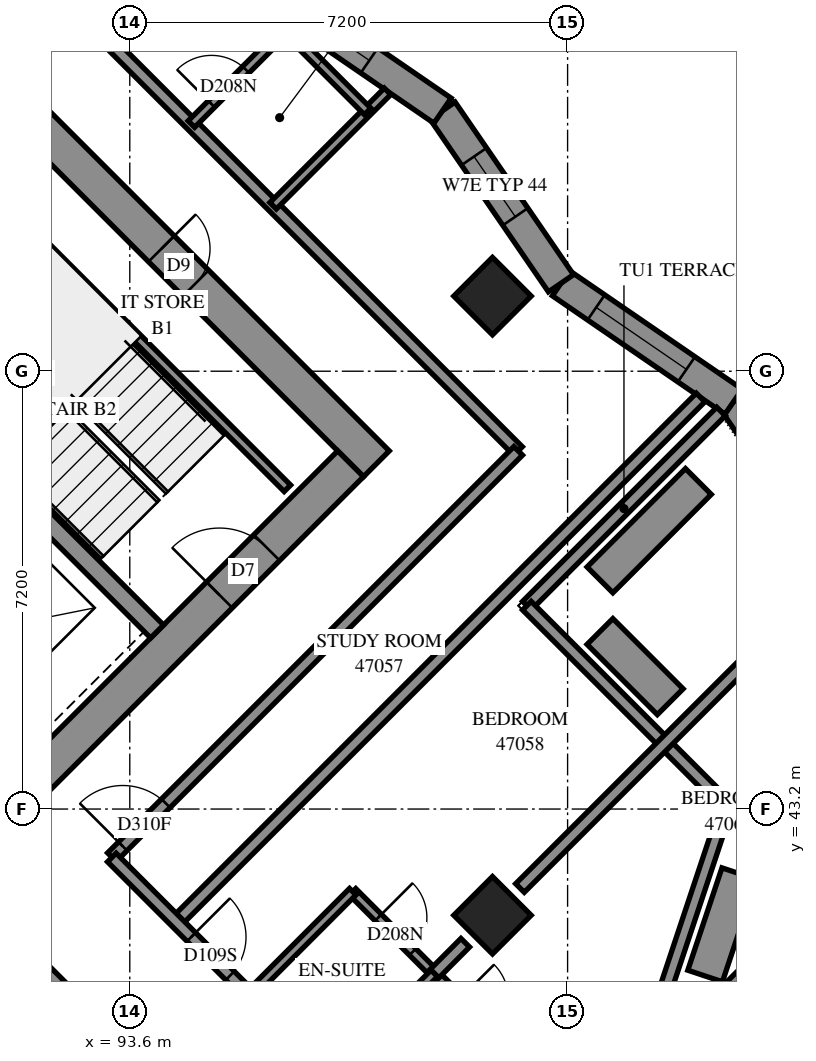
"""IFC4 building model, lengths in metres.
Left out: names, types, materials, properties, quantities, classifications, styles, units other than length and angle.
Written with IfcOpenShell. Run it as: python <this file> out.ifc"""

import sys

from ifc_helpers import new_model, si_unit, direction, frame, frame_2d, origin, origin_2d, place, context, subcontext, project, spatial, polyline, rectangle, outline, extrude, element, fill, save


model = new_model("IFC4")
c1 = context("Model", 3, precision=1e-05, world=origin(), true_north=direction((0.0, 1.0)))
c2 = subcontext(c1, "Body", "Model", "MODEL_VIEW")
j1 = project(units=[si_unit("LENGTHUNIT", "METRE"), si_unit("PLANEANGLEUNIT", "RADIAN")], contexts=[c1])
p1 = place(None, origin())
s1 = spatial("IfcSite", under=j1, at=p1, CompositionType="ELEMENT")
p2 = place(p1, origin())
s2 = spatial("IfcBuilding", under=s1, at=p2, CompositionType="ELEMENT")
p3 = place(p2, frame((0.0, 0.0, 172.8)))
s3 = spatial("IfcBuildingStorey", under=s2, at=p3, CompositionType="ELEMENT", Elevation=172.8)
for number, where, z_axis, x_axis in (
    (1, (99.565, 51.635, 0.0), (0.0, 0.0, 1.0), (0.707, -0.707, 0.0)),
    (2, (99.565, 41.453, 0.0), (0.0, 0.0, 1.0), (0.707, -0.707, 0.0)),
):
    element("IfcColumn", number, at=place(p3, frame(where, z_axis=z_axis, x_axis=x_axis)), inside=s3, PredefinedType="COLUMN", context=c2, shape_type="SweptSolid", body=[
        extrude(rectangle(XDim=0.9, YDim=0.9, at=origin_2d()), origin(), (0.0, 0.0, 1.0), 3.1),
    ])
p4 = place(p3, frame((86.625, 59.908, -0.3), z_axis=(0.0, 0.0, 1.0), x_axis=(0.7071067812, -0.7071067812, 0.0)))
e3 = element("IfcWall", 3, at=p4, inside=s3, PredefinedType="SHEAR", context=c2, shape_type="SweptSolid", body=[
    extrude(rectangle(XDim=15.6, YDim=0.6, at=frame_2d((7.8, 0.0))), origin(), (0.0, 0.0, 1.0), 2.7),
])
p5 = place(p4, frame((10.6, 0.0, 0.3)))
e4 = element("IfcOpeningElement", 4, at=p5, cuts=e3, PredefinedType="OPENING", context=c2, shape_type="SweptSolid", body=[
    extrude(rectangle(XDim=0.8, YDim=2.1, at=frame_2d((0.4, 1.05))), frame((0.0, 0.31, 0.0), z_axis=(0.0, -1.0, 0.0), x_axis=(1.0, 0.0, 0.0)), (0.0, 0.0, 1.0), 0.62),
])
p6 = place(p3, frame((87.049, 38.695, -0.3), z_axis=(0.0, 0.0, 1.0), x_axis=(0.7071067812, 0.7071067812, 0.0)))
e5 = element("IfcWall", 5, at=p6, inside=s3, PredefinedType="SHEAR", context=c2, shape_type="SweptSolid", body=[
    extrude(rectangle(XDim=14.4, YDim=0.6, at=frame_2d((7.2, 0.0))), origin(), (0.0, 0.0, 1.0), 2.7),
])
p7 = place(p6, frame((4.55, 0.0, 0.3)))
e6 = element("IfcOpeningElement", 6, at=p7, cuts=e5, PredefinedType="OPENING", context=c2, shape_type="SweptSolid", body=[
    extrude(rectangle(XDim=1.1, YDim=2.1, at=frame_2d((0.55, 1.05))), frame((0.0, 0.31, 0.0), z_axis=(0.0, -1.0, 0.0), x_axis=(1.0, 0.0, 0.0)), (0.0, 0.0, 1.0), 0.62),
])
p8 = place(p6, frame((11.35, 0.0, 0.3)))
e7 = element("IfcOpeningElement", 7, at=p8, cuts=e5, PredefinedType="OPENING", context=c2, shape_type="SweptSolid", body=[
    extrude(rectangle(XDim=1.1, YDim=2.1, at=frame_2d((0.55, 1.05))), frame((0.0, 0.31, 0.0), z_axis=(0.0, -1.0, 0.0), x_axis=(1.0, 0.0, 0.0)), (0.0, 0.0, 1.0), 0.62),
])
p9 = place(p3, frame((88.958, 51.211, 0.0), z_axis=(0.0, 0.0, 1.0), x_axis=(0.7070998367, -0.7071137256, 0.0)))
e8 = element("IfcWall", 8, at=p9, inside=s3, PredefinedType="SOLIDWALL", context=c2, shape_type="SweptSolid", body=[
    extrude(rectangle(XDim=7.2, YDim=0.3, at=frame_2d((3.6, 0.0))), origin(), (0.0, 0.0, 1.0), 3.1),
])
p10 = place(p3, frame((105.489, 47.042, 0.0), z_axis=(0.0, 0.0, 1.0), x_axis=(-0.5657493712, 0.8245772547, 0.0)))
e9 = element("IfcWall", 9, at=p10, inside=s3, PredefinedType="SOLIDWALL", context=c2, shape_type="SweptSolid", body=[
    extrude(outline(polyline([(0.068, -0.25), (3.511, -0.25), (3.417, 0.25), (-0.068, 0.25), (0.068, -0.25)])), origin(), (0.0, 0.0, 1.0), 3.1),
])
p11 = place(p10, frame((0.809, 0.0, 0.7)))
e10 = element("IfcOpeningElement", 10, at=p11, cuts=e9, PredefinedType="OPENING", context=c2, shape_type="SweptSolid", body=[
    extrude(rectangle(XDim=1.8, YDim=1.8, at=frame_2d((0.9, 0.9))), frame((0.0, 0.26, 0.0), z_axis=(0.0, -1.0, 0.0), x_axis=(1.0, 0.0, 0.0)), (0.0, 0.0, 1.0), 0.52),
])
p12 = place(p3, frame((103.53, 49.899, 0.0), z_axis=(0.0, 0.0, 1.0), x_axis=(-0.8245704852, 0.5657592376, 0.0)))
e11 = element("IfcWall", 11, at=p12, inside=s3, PredefinedType="SOLIDWALL", context=c2, shape_type="SweptSolid", body=[
    extrude(outline(polyline([(-0.046, -0.25), (3.396, -0.25), (3.489, 0.25), (0.046, 0.25), (-0.046, -0.25)])), origin(), (0.0, 0.0, 1.0), 3.1),
])
p13 = place(p12, frame((0.941, 0.0, 0.7)))
e12 = element("IfcOpeningElement", 12, at=p13, cuts=e11, PredefinedType="OPENING", context=c2, shape_type="SweptSolid", body=[
    extrude(rectangle(XDim=1.8, YDim=2.1, at=frame_2d((0.9, 1.05))), frame((0.0, 0.26, 0.0), z_axis=(0.0, -1.0, 0.0), x_axis=(1.0, 0.0, 0.0)), (0.0, 0.0, 1.0), 0.52),
])
p14 = place(p3, frame((100.691, 51.846, 0.0), z_axis=(0.0, 0.0, 1.0), x_axis=(-0.5657654369, 0.8245662316, 0.0)))
e13 = element("IfcWall", 13, at=p14, inside=s3, PredefinedType="SOLIDWALL", context=c2, shape_type="SweptSolid", body=[
    extrude(outline(polyline([(0.046, -0.25), (3.489, -0.25), (3.396, 0.25), (-0.046, 0.25), (0.046, -0.25)])), origin(), (0.0, 0.0, 1.0), 3.1),
])
p15 = place(p14, frame((1.327, 0.0, 0.45)))
e14 = element("IfcOpeningElement", 14, at=p15, cuts=e13, PredefinedType="OPENING", context=c2, shape_type="SweptSolid", body=[
    extrude(rectangle(XDim=1.2, YDim=2.5, at=frame_2d((0.6, 1.25))), frame((0.0, 0.26, 0.0), z_axis=(0.0, -1.0, 0.0), x_axis=(1.0, 0.0, 0.0)), (0.0, 0.0, 1.0), 0.52),
])
p16 = place(p3, frame((98.744, 54.685, 0.0), z_axis=(0.0, 0.0, 1.0), x_axis=(-0.8245797835, 0.5657456855, 0.0)))
e15 = element("IfcWall", 15, at=p16, inside=s3, PredefinedType="SOLIDWALL", context=c2, shape_type="SweptSolid", body=[
    extrude(outline(polyline([(-0.046, -0.25), (3.396, -0.25), (3.489, 0.25), (0.046, 0.25), (-0.046, -0.25)])), origin(), (0.0, 0.0, 1.0), 3.1),
])
p17 = place(p16, frame((1.46, 0.0, 0.45)))
e16 = element("IfcOpeningElement", 16, at=p17, cuts=e15, PredefinedType="OPENING", context=c2, shape_type="SweptSolid", body=[
    extrude(rectangle(XDim=1.2, YDim=2.5, at=frame_2d((0.6, 1.25))), frame((0.0, 0.26, 0.0), z_axis=(0.0, -1.0, 0.0), x_axis=(1.0, 0.0, 0.0)), (0.0, 0.0, 1.0), 0.52),
])
p18 = place(p3, frame((103.323, 49.737, 0.0), z_axis=(0.0, 0.0, 1.0), x_axis=(-0.707117854, -0.7070957082, 0.0)))
e17 = element("IfcWall", 17, at=p18, inside=s3, PredefinedType="PARAPET", context=c2, shape_type="SweptSolid", body=[
    extrude(outline(polyline([(0.0, -0.1), (4.615, -0.1), (4.415, 0.1), (0.0, 0.1), (0.0, -0.1)])), origin(), (0.0, 0.0, 1.0), 0.25),
])
p19 = place(p3, frame((100.13, 46.544, 0.0), z_axis=(0.0, 0.0, 1.0), x_axis=(0.7070852627, -0.707128299, 0.0)))
e18 = element("IfcWall", 18, at=p19, inside=s3, PredefinedType="PARAPET", context=c2, shape_type="SweptSolid", body=[
    extrude(outline(polyline([(-0.1, -0.1), (4.585, -0.1), (4.709, 0.1), (0.1, 0.1), (-0.1, -0.1)])), origin(), (0.0, 0.0, 1.0), 0.25),
])
p20 = place(p3, frame((103.416, 43.258, 0.0), z_axis=(0.0, 0.0, 1.0), x_axis=(-0.3160011426, -0.9487588091, 0.0)))
e19 = element("IfcWall", 19, at=p20, inside=s3, PredefinedType="PARAPET", context=c2, shape_type="SweptSolid", body=[
    extrude(outline(polyline([(0.062, -0.1), (0.397, -0.1), (0.397, 0.1), (-0.062, 0.1), (0.062, -0.1)])), origin(), (0.0, 0.0, 1.0), 0.25),
])
p21 = place(p3, frame((103.291, 42.881, 0.0), z_axis=(0.0, 0.0, 1.0), x_axis=(-0.3162443117, -0.9486777827, 0.0)))
e20 = element("IfcWall", 20, at=p21, inside=s3, PredefinedType="PARAPET", context=c2, shape_type="SweptSolid", body=[
    extrude(outline(polyline([(0.0, -0.1), (3.626, -0.1), (3.626, 0.1), (0.0, 0.1), (0.0, -0.1)])), origin(), (0.0, 0.0, 1.0), 0.25),
])
p22 = place(p3, frame((101.332, 46.12, 0.0), z_axis=(0.0, 0.0, 1.0), x_axis=(0.7070761738, -0.7071373872, 0.0)))
e21 = element("IfcWall", 21, at=p22, inside=s3, PredefinedType="SOLIDWALL", context=c2, shape_type="SweptSolid", body=[
    extrude(rectangle(XDim=1.634, YDim=0.6, at=frame_2d((0.817, 0.0))), origin(), (0.0, 0.0, 1.0), 0.65),
])
p23 = place(p3, frame((103.623, 42.138, 0.0), z_axis=(0.0, 0.0, 1.0), x_axis=(-0.3162446684, -0.9486776638, 0.0)))
e22 = element("IfcWall", 22, at=p23, inside=s3, PredefinedType="SOLIDWALL", context=c2, shape_type="SweptSolid", body=[
    extrude(rectangle(XDim=1.775, YDim=0.6, at=frame_2d((0.887, 0.0))), origin(), (0.0, 0.0, 1.0), 0.65),
])
p24 = place(p3, frame((91.313, 53.354, 0.0), z_axis=(0.0, 0.0, 1.0), x_axis=(0.7071140275, -0.7070995348, 0.0)))
e23 = element("IfcWall", 23, at=p24, inside=s3, PredefinedType="PARTITIONING", context=c2, shape_type="SweptSolid", body=[
    extrude(rectangle(XDim=6.9, YDim=0.15, at=frame_2d((3.45, 0.0))), origin(), (0.0, 0.0, 1.0), 3.1),
])
p25 = place(p3, frame((94.366, 41.348, 0.0), z_axis=(0.0, 0.0, 1.0), x_axis=(0.7071108825, 0.7071026798, 0.0)))
e24 = element("IfcWall", 24, at=p25, inside=s3, PredefinedType="PARTITIONING", context=c2, shape_type="SweptSolid", body=[
    extrude(rectangle(XDim=12.191, YDim=0.2, at=frame_2d((6.096, 0.0))), origin(), (0.0, 0.0, 1.0), 3.1),
])
p26 = place(p3, frame((91.967, 40.785, 0.0), z_axis=(0.0, 0.0, 1.0), x_axis=(0.7071067812, -0.7071067812, 0.0)))
e25 = element("IfcWall", 25, at=p26, inside=s3, PredefinedType="PARTITIONING", context=c2, shape_type="SweptSolid", body=[
    extrude(rectangle(XDim=12.1, YDim=0.2, at=frame_2d((6.05, 0.0))), origin(), (0.0, 0.0, 1.0), 3.1),
])
p27 = place(p26, frame((3.448, 0.0, 0.0)))
e26 = element("IfcOpeningElement", 26, at=p27, cuts=e25, PredefinedType="OPENING", context=c2, shape_type="SweptSolid", body=[
    extrude(rectangle(XDim=0.9, YDim=2.1, at=frame_2d((0.45, 1.05))), frame((0.0, 0.11, 0.0), z_axis=(0.0, -1.0, 0.0), x_axis=(1.0, 0.0, 0.0)), (0.0, 0.0, 1.0), 0.22),
])
p28 = place(p26, frame((8.457, 0.0, 0.0)))
e27 = element("IfcOpeningElement", 27, at=p28, cuts=e25, PredefinedType="OPENING", context=c2, shape_type="SweptSolid", body=[
    extrude(rectangle(XDim=1.0, YDim=2.1, at=frame_2d((0.5, 1.05))), frame((0.0, 0.11, 0.0), z_axis=(0.0, -1.0, 0.0), x_axis=(1.0, 0.0, 0.0)), (0.0, 0.0, 1.0), 0.22),
])
p29 = place(p3, frame((91.755, 57.317, 0.0), z_axis=(0.0, 0.0, 1.0), x_axis=(0.7071067812, -0.7071067812, 0.0)))
e28 = element("IfcWall", 28, at=p29, inside=s3, PredefinedType="PARTITIONING", context=c2, shape_type="SweptSolid", body=[
    extrude(rectangle(XDim=11.639, YDim=0.2, at=frame_2d((5.819, 0.0))), origin(), (0.0, 0.0, 1.0), 3.1),
])
p30 = place(p3, frame((93.306, 42.408, 0.0), z_axis=(0.0, 0.0, 1.0), x_axis=(0.7071067812, 0.7071067812, 0.0)))
e29 = element("IfcWall", 29, at=p30, inside=s3, PredefinedType="PARTITIONING", context=c2, shape_type="SweptSolid", body=[
    extrude(rectangle(XDim=9.45, YDim=0.2, at=frame_2d((4.725, 0.0))), origin(), (0.0, 0.0, 1.0), 3.1),
])
p31 = place(p30, frame((0.253, 0.0, 0.0)))
e30 = element("IfcOpeningElement", 30, at=p31, cuts=e29, PredefinedType="OPENING", context=c2, shape_type="SweptSolid", body=[
    extrude(rectangle(XDim=1.0, YDim=2.1, at=frame_2d((0.5, 1.05))), frame((0.0, 0.11, 0.0), z_axis=(0.0, -1.0, 0.0), x_axis=(1.0, 0.0, 0.0)), (0.0, 0.0, 1.0), 0.22),
])
p32 = place(p3, frame((99.458, 36.256, 0.0), z_axis=(0.0, 0.0, 1.0), x_axis=(0.7071067812, 0.7071067812, 0.0)))
e31 = element("IfcWall", 31, at=p32, inside=s3, PredefinedType="PARTITIONING", context=c2, shape_type="SweptSolid", body=[
    extrude(rectangle(XDim=6.85, YDim=0.2, at=frame_2d((3.425, 0.0))), origin(), (0.0, 0.0, 1.0), 3.1),
])
p33 = place(p3, frame((100.017, 41.901, 0.0), z_axis=(0.0, 0.0, 1.0), x_axis=(0.7072754814, 0.7069380408, 0.0)))
e32 = element("IfcWall", 32, at=p33, inside=s3, PredefinedType="PARTITIONING", context=c2, shape_type="SweptSolid", body=[
    extrude(rectangle(XDim=5.927, YDim=0.2, at=frame_2d((2.963, 0.0))), origin(), (0.0, 0.0, 1.0), 3.1),
])
p34 = place(p3, frame((97.263, 41.839, 0.0), z_axis=(0.0, 0.0, 1.0), x_axis=(0.7071067812, -0.7071067812, 0.0)))
e33 = element("IfcWall", 33, at=p34, inside=s3, PredefinedType="PARTITIONING", context=c2, shape_type="SweptSolid", body=[
    extrude(rectangle(XDim=3.801, YDim=0.15, at=frame_2d((1.901, 0.0))), origin(), (0.0, 0.0, 1.0), 3.1),
])
p35 = place(p34, frame((0.598, 0.0, 0.0)))
e34 = element("IfcOpeningElement", 34, at=p35, cuts=e33, PredefinedType="OPENING", context=c2, shape_type="SweptSolid", body=[
    extrude(rectangle(XDim=0.8, YDim=2.1, at=frame_2d((0.4, 1.05))), frame((0.0, 0.085, 0.0), z_axis=(0.0, -1.0, 0.0), x_axis=(1.0, 0.0, 0.0)), (0.0, 0.0, 1.0), 0.17),
])
p36 = place(p34, frame((2.493, 0.0, 0.0)))
e35 = element("IfcOpeningElement", 35, at=p36, cuts=e33, PredefinedType="OPENING", context=c2, shape_type="SweptSolid", body=[
    extrude(rectangle(XDim=0.8, YDim=2.1, at=frame_2d((0.4, 1.05))), frame((0.0, 0.085, 0.0), z_axis=(0.0, -1.0, 0.0), x_axis=(1.0, 0.0, 0.0)), (0.0, 0.0, 1.0), 0.17),
])
p37 = place(p3, frame((93.305, 42.403, 0.0), z_axis=(0.0, 0.0, 1.0), x_axis=(0.7071067812, -0.7071067812, 0.0)))
e36 = element("IfcWall", 36, at=p37, inside=s3, PredefinedType="PARTITIONING", context=c2, shape_type="SweptSolid", body=[
    extrude(rectangle(XDim=3.199, YDim=0.2, at=frame_2d((1.599, 0.0))), origin(), (0.0, 0.0, 1.0), 3.1),
])
p38 = place(p37, frame((1.848, 0.0, 0.0)))
e37 = element("IfcOpeningElement", 37, at=p38, cuts=e36, PredefinedType="OPENING", context=c2, shape_type="SweptSolid", body=[
    extrude(rectangle(XDim=0.9, YDim=2.1, at=frame_2d((0.45, 1.05))), frame((0.0, 0.11, 0.0), z_axis=(0.0, -1.0, 0.0), x_axis=(1.0, 0.0, 0.0)), (0.0, 0.0, 1.0), 0.22),
])
p39 = place(p3, frame((95.957, 53.121, 0.0), z_axis=(0.0, 0.0, 1.0), x_axis=(0.7070879914, 0.7071255705, 0.0)))
e38 = element("IfcWall", 38, at=p39, inside=s3, PredefinedType="PARTITIONING", context=c2, shape_type="SweptSolid", body=[
    extrude(rectangle(XDim=2.661, YDim=0.15, at=frame_2d((1.331, 0.0))), origin(), (0.0, 0.0, 1.0), 3.1),
])
p40 = place(p3, frame((95.779, 56.405, 0.0), z_axis=(0.0, 0.0, 1.0), x_axis=(0.7071067812, -0.7071067812, 0.0)))
e39 = element("IfcWall", 39, at=p40, inside=s3, PredefinedType="PARTITIONING", context=c2, shape_type="SweptSolid", body=[
    extrude(rectangle(XDim=2.449, YDim=0.15, at=frame_2d((1.225, 0.0))), origin(), (0.0, 0.0, 1.0), 3.1),
])
p41 = place(p3, frame((95.571, 40.143, 0.0), z_axis=(0.0, 0.0, 1.0), x_axis=(0.706689978, 0.7075233388, 0.0)))
e40 = element("IfcWall", 40, at=p41, inside=s3, PredefinedType="PARTITIONING", context=c2, shape_type="SweptSolid", body=[
    extrude(rectangle(XDim=2.4, YDim=0.15, at=frame_2d((1.2, 0.0))), origin(), (0.0, 0.0, 1.0), 3.1),
])
p42 = place(p3, frame((96.913, 38.803, 0.0), z_axis=(0.0, 0.0, 1.0), x_axis=(0.7071067812, 0.7071067812, 0.0)))
e41 = element("IfcWall", 41, at=p42, inside=s3, PredefinedType="PARTITIONING", context=c2, shape_type="SweptSolid", body=[
    extrude(rectangle(XDim=2.398, YDim=0.15, at=frame_2d((1.199, 0.0))), origin(), (0.0, 0.0, 1.0), 2.6),
])
p43 = place(p3, frame((94.614, 54.464, 0.0), z_axis=(0.0, 0.0, 1.0), x_axis=(0.7070851111, 0.7071284506, 0.0)))
e42 = element("IfcWall", 42, at=p43, inside=s3, PredefinedType="PARTITIONING", context=c2, shape_type="SweptSolid", body=[
    extrude(rectangle(XDim=2.307, YDim=0.15, at=frame_2d((1.154, 0.0))), origin(), (0.0, 0.0, 1.0), 3.1),
])
p44 = place(p43, frame((0.466, 0.0, 0.0)))
e43 = element("IfcOpeningElement", 43, at=p44, cuts=e42, PredefinedType="OPENING", context=c2, shape_type="SweptSolid", body=[
    extrude(rectangle(XDim=0.8, YDim=2.1, at=frame_2d((0.4, 1.05))), frame((0.0, 0.085, 0.0), z_axis=(0.0, -1.0, 0.0), x_axis=(1.0, 0.0, 0.0)), (0.0, 0.0, 1.0), 0.17),
])
p45 = place(p3, frame((98.613, 40.495, 0.0), z_axis=(0.0, 0.0, 1.0), x_axis=(0.7057051861, 0.7085056035, 0.0)))
e44 = element("IfcWall", 44, at=p45, inside=s3, PredefinedType="PARTITIONING", context=c2, shape_type="SweptSolid", body=[
    extrude(rectangle(XDim=0.714, YDim=0.2, at=frame_2d((0.357, 0.0))), origin(), (0.0, 0.0, 1.0), 2.6),
])
p46 = place(p3, frame((102.951, 48.587, 0.0), z_axis=(0.0, 0.0, 1.0), x_axis=(-0.7071067812, -0.7071067812, 0.0)))
e45 = element("IfcWall", 45, at=p46, inside=s3, PredefinedType="SOLIDWALL", context=c2, shape_type="SweptSolid", body=[
    extrude(outline(polyline([(0.0, -0.3), (2.288, -0.3), (2.288, 0.3), (0.0, 0.3), (0.0, -0.3)])), origin(), (0.0, 0.0, 1.0), 0.65),
])
p47 = place(p13, origin())
e46 = element("IfcWindow", 46, at=p47, inside=s3, PartitioningType="SINGLE_PANEL", PredefinedType="WINDOW", context=c2, shape_type="SweptSolid", body=[
    extrude(rectangle(XDim=1.8, YDim=2.1, at=frame_2d((0.9, 1.05))), frame((0.0, 0.18, 0.0), z_axis=(0.0, -1.0, 0.0), x_axis=(1.0, 0.0, 0.0)), (0.0, 0.0, 1.0), 0.06),
])
fill(e12, e46)
p48 = place(p15, origin())
e47 = element("IfcWindow", 47, at=p48, inside=s3, PartitioningType="SINGLE_PANEL", PredefinedType="WINDOW", context=c2, shape_type="SweptSolid", body=[
    extrude(rectangle(XDim=1.2, YDim=2.5, at=frame_2d((0.6, 1.25))), frame((0.0, 0.18, 0.0), z_axis=(0.0, -1.0, 0.0), x_axis=(1.0, 0.0, 0.0)), (0.0, 0.0, 1.0), 0.06),
])
fill(e14, e47)
p49 = place(p17, origin())
e48 = element("IfcWindow", 48, at=p49, inside=s3, PartitioningType="SINGLE_PANEL", PredefinedType="WINDOW", context=c2, shape_type="SweptSolid", body=[
    extrude(rectangle(XDim=1.2, YDim=2.5, at=frame_2d((0.6, 1.25))), frame((0.0, 0.18, 0.0), z_axis=(0.0, -1.0, 0.0), x_axis=(1.0, 0.0, 0.0)), (0.0, 0.0, 1.0), 0.06),
])
fill(e16, e48)
p50 = place(p5, origin())
e49 = element("IfcDoor", 49, at=p50, inside=s3, OperationType="SINGLE_SWING_RIGHT", PredefinedType="DOOR", context=c2, shape_type="SweptSolid", body=[
    extrude(rectangle(XDim=0.8, YDim=2.1, at=frame_2d((0.4, 1.05))), frame((0.0, 0.025, 0.0), z_axis=(0.0, -1.0, 0.0), x_axis=(1.0, 0.0, 0.0)), (0.0, 0.0, 1.0), 0.05),
])
fill(e4, e49)
p51 = place(p8, origin())
e50 = element("IfcDoor", 50, at=p51, inside=s3, OperationType="SINGLE_SWING_RIGHT", PredefinedType="DOOR", context=c2, shape_type="SweptSolid", body=[
    extrude(rectangle(XDim=1.1, YDim=2.1, at=frame_2d((0.55, 1.05))), frame((0.0, 0.025, 0.0), z_axis=(0.0, -1.0, 0.0), x_axis=(1.0, 0.0, 0.0)), (0.0, 0.0, 1.0), 0.05),
])
fill(e7, e50)
p52 = place(p31, origin())
e51 = element("IfcDoor", 51, at=p52, inside=s3, OperationType="SINGLE_SWING_RIGHT", PredefinedType="DOOR", context=c2, shape_type="SweptSolid", body=[
    extrude(rectangle(XDim=1.0, YDim=2.1, at=frame_2d((0.5, 1.05))), frame((0.0, 0.025, 0.0), z_axis=(0.0, -1.0, 0.0), x_axis=(1.0, 0.0, 0.0)), (0.0, 0.0, 1.0), 0.05),
])
fill(e30, e51)
p53 = place(p38, origin())
e52 = element("IfcDoor", 52, at=p53, inside=s3, OperationType="SINGLE_SWING_RIGHT", PredefinedType="DOOR", context=c2, shape_type="SweptSolid", body=[
    extrude(rectangle(XDim=0.9, YDim=2.1, at=frame_2d((0.45, 1.05))), frame((0.0, 0.025, 0.0), z_axis=(0.0, -1.0, 0.0), x_axis=(1.0, 0.0, 0.0)), (0.0, 0.0, 1.0), 0.05),
])
fill(e37, e52)
p54 = place(p35, origin())
e53 = element("IfcDoor", 53, at=p54, inside=s3, OperationType="SINGLE_SWING_RIGHT", PredefinedType="DOOR", context=c2, shape_type="SweptSolid", body=[
    extrude(rectangle(XDim=0.8, YDim=2.1, at=frame_2d((0.4, 1.05))), frame((0.0, 0.025, 0.0), z_axis=(0.0, -1.0, 0.0), x_axis=(1.0, 0.0, 0.0)), (0.0, 0.0, 1.0), 0.05),
])
fill(e34, e53)
p55 = place(p44, origin())
e54 = element("IfcDoor", 54, at=p55, inside=s3, OperationType="SINGLE_SWING_RIGHT", PredefinedType="DOOR", context=c2, shape_type="SweptSolid", body=[
    extrude(rectangle(XDim=0.8, YDim=2.1, at=frame_2d((0.4, 1.05))), frame((0.0, 0.025, 0.0), z_axis=(0.0, -1.0, 0.0), x_axis=(1.0, 0.0, 0.0)), (0.0, 0.0, 1.0), 0.05),
])
fill(e43, e54)
save(model, sys.argv[1])
